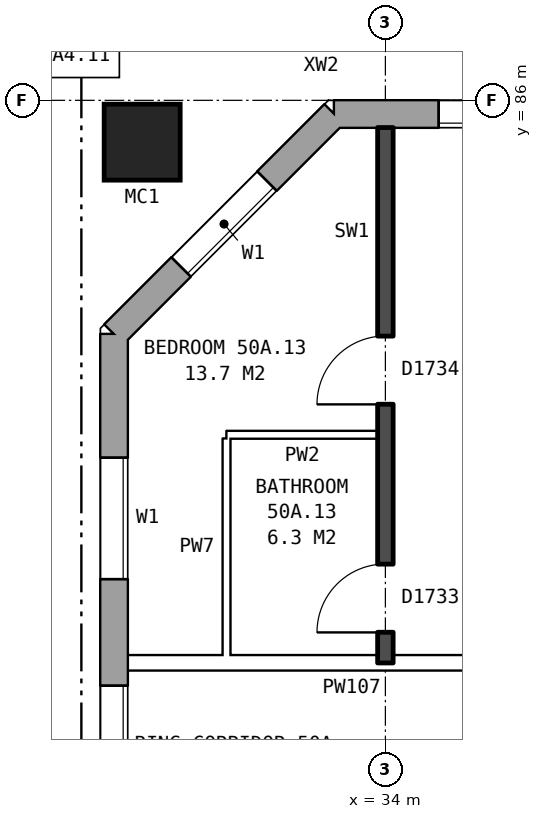
"""IFC4 building model, lengths in metres.
Left out: names, types, materials, properties, quantities, classifications, styles, units other than length and angle.
Written with IfcOpenShell. Run it as: python <this file> out.ifc"""

import sys

from ifc_helpers import new_model, si_unit, direction, frame, frame_2d, origin, origin_2d, place, context, subcontext, project, spatial, rectangle, hollow_rectangle, extrude, element, fill, save


model = new_model("IFC4")
c1 = context("Model", 3, precision=1e-05, world=origin(), true_north=direction((0.0, 1.0)))
c2 = subcontext(c1, "Body", "Model", "MODEL_VIEW")
j1 = project(units=[si_unit("LENGTHUNIT", "METRE"), si_unit("PLANEANGLEUNIT", "RADIAN")], contexts=[c1])
p1 = place(None, origin())
s1 = spatial("IfcSite", under=j1, at=p1, CompositionType="ELEMENT")
p2 = place(p1, origin())
s2 = spatial("IfcBuilding", under=s1, at=p2, CompositionType="ELEMENT")
p3 = place(p2, frame((0.0, 0.0, 178.9)))
s3 = spatial("IfcBuildingStorey", under=s2, at=p3, CompositionType="ELEMENT", Elevation=178.9)
p4 = place(p3, frame((30.8, 85.45, 0.0), z_axis=(0.0, 0.0, 1.0), x_axis=(1.0, 0.0, 0.0)))
e1 = element("IfcColumn", 1, at=p4, inside=s3, PredefinedType="COLUMN", context=c2, shape_type="SweptSolid", body=[
    extrude(hollow_rectangle(XDim=1.0, YDim=1.0, WallThickness=0.055, at=origin_2d()), origin(), (0.0, 0.0, 1.0), 3.1),
])
p5 = place(p3, frame((72.925, 85.82, 0.0), z_axis=(0.0, 0.0, 1.0), x_axis=(-1.0, 0.0, 0.0)))
e2 = element("IfcWall", 2, at=p5, inside=s3, PredefinedType="STANDARD", context=c2, shape_type="SweptSolid", body=[
    extrude(rectangle(XDim=39.601, YDim=0.36, at=frame_2d((19.8, 0.0))), origin(), (0.0, 0.0, 1.0), 2.85),
])
p6 = place(p5, frame((0.625, 0.0, 0.8)))
e3 = element("IfcOpeningElement", 3, at=p6, cuts=e2, PredefinedType="OPENING", context=c2, shape_type="SweptSolid", body=[
    extrude(rectangle(XDim=1.6, YDim=1.8, at=frame_2d((0.8, 0.9))), frame((0.0, 0.19, 0.0), z_axis=(0.0, -1.0, 0.0), x_axis=(1.0, 0.0, 0.0)), (0.0, 0.0, 1.0), 0.38),
])
p7 = place(p5, frame((3.125, 0.0, 0.8)))
e4 = element("IfcOpeningElement", 4, at=p7, cuts=e2, PredefinedType="OPENING", context=c2, shape_type="SweptSolid", body=[
    extrude(rectangle(XDim=1.6, YDim=1.8, at=frame_2d((0.8, 0.9))), frame((0.0, 0.19, 0.0), z_axis=(0.0, -1.0, 0.0), x_axis=(1.0, 0.0, 0.0)), (0.0, 0.0, 1.0), 0.38),
])
p8 = place(p5, frame((5.025, 0.0, 1.7)))
e5 = element("IfcOpeningElement", 5, at=p8, cuts=e2, PredefinedType="OPENING", context=c2, shape_type="SweptSolid", body=[
    extrude(rectangle(XDim=0.6, YDim=0.9, at=frame_2d((0.3, 0.45))), frame((0.0, 0.19, 0.0), z_axis=(0.0, -1.0, 0.0), x_axis=(1.0, 0.0, 0.0)), (0.0, 0.0, 1.0), 0.38),
])
p9 = place(p5, frame((9.625, 0.0, 0.8)))
e6 = element("IfcOpeningElement", 6, at=p9, cuts=e2, PredefinedType="OPENING", context=c2, shape_type="SweptSolid", body=[
    extrude(rectangle(XDim=1.6, YDim=1.8, at=frame_2d((0.8, 0.9))), frame((0.0, 0.19, 0.0), z_axis=(0.0, -1.0, 0.0), x_axis=(1.0, 0.0, 0.0)), (0.0, 0.0, 1.0), 0.38),
])
p10 = place(p5, frame((12.625, 0.0, 0.8)))
e7 = element("IfcOpeningElement", 7, at=p10, cuts=e2, PredefinedType="OPENING", context=c2, shape_type="SweptSolid", body=[
    extrude(rectangle(XDim=1.6, YDim=1.8, at=frame_2d((0.8, 0.9))), frame((0.0, 0.19, 0.0), z_axis=(0.0, -1.0, 0.0), x_axis=(1.0, 0.0, 0.0)), (0.0, 0.0, 1.0), 0.38),
])
p11 = place(p5, frame((15.625, 0.0, 0.8)))
e8 = element("IfcOpeningElement", 8, at=p11, cuts=e2, PredefinedType="OPENING", context=c2, shape_type="SweptSolid", body=[
    extrude(rectangle(XDim=1.6, YDim=1.8, at=frame_2d((0.8, 0.9))), frame((0.0, 0.19, 0.0), z_axis=(0.0, -1.0, 0.0), x_axis=(1.0, 0.0, 0.0)), (0.0, 0.0, 1.0), 0.38),
])
p12 = place(p5, frame((18.625, 0.0, 0.8)))
e9 = element("IfcOpeningElement", 9, at=p12, cuts=e2, PredefinedType="OPENING", context=c2, shape_type="SweptSolid", body=[
    extrude(rectangle(XDim=1.6, YDim=1.8, at=frame_2d((0.8, 0.9))), frame((0.0, 0.19, 0.0), z_axis=(0.0, -1.0, 0.0), x_axis=(1.0, 0.0, 0.0)), (0.0, 0.0, 1.0), 0.38),
])
p13 = place(p5, frame((21.625, 0.0, 0.8)))
e10 = element("IfcOpeningElement", 10, at=p13, cuts=e2, PredefinedType="OPENING", context=c2, shape_type="SweptSolid", body=[
    extrude(rectangle(XDim=1.6, YDim=1.8, at=frame_2d((0.8, 0.9))), frame((0.0, 0.19, 0.0), z_axis=(0.0, -1.0, 0.0), x_axis=(1.0, 0.0, 0.0)), (0.0, 0.0, 1.0), 0.38),
])
p14 = place(p5, frame((24.625, 0.0, 0.8)))
e11 = element("IfcOpeningElement", 11, at=p14, cuts=e2, PredefinedType="OPENING", context=c2, shape_type="SweptSolid", body=[
    extrude(rectangle(XDim=1.6, YDim=1.8, at=frame_2d((0.8, 0.9))), frame((0.0, 0.19, 0.0), z_axis=(0.0, -1.0, 0.0), x_axis=(1.0, 0.0, 0.0)), (0.0, 0.0, 1.0), 0.38),
])
p15 = place(p5, frame((27.625, 0.0, 0.8)))
e12 = element("IfcOpeningElement", 12, at=p15, cuts=e2, PredefinedType="OPENING", context=c2, shape_type="SweptSolid", body=[
    extrude(rectangle(XDim=1.6, YDim=1.8, at=frame_2d((0.8, 0.9))), frame((0.0, 0.19, 0.0), z_axis=(0.0, -1.0, 0.0), x_axis=(1.0, 0.0, 0.0)), (0.0, 0.0, 1.0), 0.38),
])
p16 = place(p5, frame((30.625, 0.0, 0.8)))
e13 = element("IfcOpeningElement", 13, at=p16, cuts=e2, PredefinedType="OPENING", context=c2, shape_type="SweptSolid", body=[
    extrude(rectangle(XDim=1.6, YDim=1.8, at=frame_2d((0.8, 0.9))), frame((0.0, 0.19, 0.0), z_axis=(0.0, -1.0, 0.0), x_axis=(1.0, 0.0, 0.0)), (0.0, 0.0, 1.0), 0.38),
])
p17 = place(p5, frame((33.925, 0.0, 1.7)))
e14 = element("IfcOpeningElement", 14, at=p17, cuts=e2, PredefinedType="OPENING", context=c2, shape_type="SweptSolid", body=[
    extrude(rectangle(XDim=0.6, YDim=0.9, at=frame_2d((0.3, 0.45))), frame((0.0, 0.19, 0.0), z_axis=(0.0, -1.0, 0.0), x_axis=(1.0, 0.0, 0.0)), (0.0, 0.0, 1.0), 0.38),
])
p18 = place(p5, frame((36.625, 0.0, 0.8)))
e15 = element("IfcOpeningElement", 15, at=p18, cuts=e2, PredefinedType="OPENING", context=c2, shape_type="SweptSolid", body=[
    extrude(rectangle(XDim=1.6, YDim=1.8, at=frame_2d((0.8, 0.9))), frame((0.0, 0.19, 0.0), z_axis=(0.0, -1.0, 0.0), x_axis=(1.0, 0.0, 0.0)), (0.0, 0.0, 1.0), 0.38),
])
p19 = place(p5, frame((6.825, 0.0, 0.8)))
e16 = element("IfcOpeningElement", 16, at=p19, cuts=e2, PredefinedType="OPENING", context=c2, shape_type="SweptSolid", body=[
    extrude(rectangle(XDim=0.6, YDim=0.9, at=frame_2d((0.3, 0.45))), frame((0.0, 0.19, 0.0), z_axis=(0.0, -1.0, 0.0), x_axis=(1.0, 0.0, 0.0)), (0.0, 0.0, 1.0), 0.38),
])
p20 = place(p5, frame((7.725, 0.0, 0.8)))
e17 = element("IfcOpeningElement", 17, at=p20, cuts=e2, PredefinedType="OPENING", context=c2, shape_type="SweptSolid", body=[
    extrude(rectangle(XDim=1.0, YDim=1.8, at=frame_2d((0.5, 0.9))), frame((0.0, 0.19, 0.0), z_axis=(0.0, -1.0, 0.0), x_axis=(1.0, 0.0, 0.0)), (0.0, 0.0, 1.0), 0.38),
])
p21 = place(p5, frame((34.825, 0.0, 0.8)))
e18 = element("IfcOpeningElement", 18, at=p21, cuts=e2, PredefinedType="OPENING", context=c2, shape_type="SweptSolid", body=[
    extrude(rectangle(XDim=1.4, YDim=1.8, at=frame_2d((0.7, 0.9))), frame((0.0, 0.19, 0.0), z_axis=(0.0, -1.0, 0.0), x_axis=(1.0, 0.0, 0.0)), (0.0, 0.0, 1.0), 0.38),
])
p22 = place(p3, frame((33.325, 85.82, 0.0), z_axis=(0.0, 0.0, 1.0), x_axis=(-0.707106781187, -0.707106781187, 0.0)))
e19 = element("IfcWall", 19, at=p22, inside=s3, PredefinedType="STANDARD", context=c2, shape_type="SweptSolid", body=[
    extrude(rectangle(XDim=4.094, YDim=0.36, at=frame_2d((2.047, 0.0))), origin(), (0.0, 0.0, 1.0), 2.85),
])
p23 = place(p22, frame((1.247, 0.0, 0.8)))
e20 = element("IfcOpeningElement", 20, at=p23, cuts=e19, PredefinedType="OPENING", context=c2, shape_type="SweptSolid", body=[
    extrude(rectangle(XDim=1.6, YDim=1.8, at=frame_2d((0.8, 0.9))), frame((0.0, 0.19, 0.0), z_axis=(0.0, -1.0, 0.0), x_axis=(1.0, 0.0, 0.0)), (0.0, 0.0, 1.0), 0.38),
])
p24 = place(p3, frame((30.43, 82.925, 0.0), z_axis=(0.0, 0.0, 1.0), x_axis=(0.0, -1.0, 0.0)))
e21 = element("IfcWall", 21, at=p24, inside=s3, PredefinedType="STANDARD", context=c2, shape_type="SweptSolid", body=[
    extrude(rectangle(XDim=25.851, YDim=0.36, at=frame_2d((12.925, 0.0))), origin(), (0.0, 0.0, 1.0), 2.85),
])
p25 = place(p24, frame((1.625, 0.0, 0.8)))
e22 = element("IfcOpeningElement", 22, at=p25, cuts=e21, PredefinedType="OPENING", context=c2, shape_type="SweptSolid", body=[
    extrude(rectangle(XDim=1.6, YDim=1.8, at=frame_2d((0.8, 0.9))), frame((0.0, 0.19, 0.0), z_axis=(0.0, -1.0, 0.0), x_axis=(1.0, 0.0, 0.0)), (0.0, 0.0, 1.0), 0.38),
])
p26 = place(p24, frame((4.625, 0.0, 0.8)))
e23 = element("IfcOpeningElement", 23, at=p26, cuts=e21, PredefinedType="OPENING", context=c2, shape_type="SweptSolid", body=[
    extrude(rectangle(XDim=1.6, YDim=1.8, at=frame_2d((0.8, 0.9))), frame((0.0, 0.19, 0.0), z_axis=(0.0, -1.0, 0.0), x_axis=(1.0, 0.0, 0.0)), (0.0, 0.0, 1.0), 0.38),
])
p27 = place(p24, frame((6.525, 0.0, 0.8)))
e24 = element("IfcOpeningElement", 24, at=p27, cuts=e21, PredefinedType="OPENING", context=c2, shape_type="SweptSolid", body=[
    extrude(rectangle(XDim=1.4, YDim=1.8, at=frame_2d((0.7, 0.9))), frame((0.0, 0.19, 0.0), z_axis=(0.0, -1.0, 0.0), x_axis=(1.0, 0.0, 0.0)), (0.0, 0.0, 1.0), 0.38),
])
p28 = place(p24, frame((8.225, 0.0, 1.6)))
e25 = element("IfcOpeningElement", 25, at=p28, cuts=e21, PredefinedType="OPENING", context=c2, shape_type="SweptSolid", body=[
    extrude(rectangle(XDim=0.8, YDim=0.9, at=frame_2d((0.4, 0.45))), frame((0.0, 0.19, 0.0), z_axis=(0.0, -1.0, 0.0), x_axis=(1.0, 0.0, 0.0)), (0.0, 0.0, 1.0), 0.38),
])
p29 = place(p24, frame((10.075, 0.0, 0.8)))
e26 = element("IfcOpeningElement", 26, at=p29, cuts=e21, PredefinedType="OPENING", context=c2, shape_type="SweptSolid", body=[
    extrude(rectangle(XDim=1.0, YDim=0.9, at=frame_2d((0.5, 0.45))), frame((0.0, 0.19, 0.0), z_axis=(0.0, -1.0, 0.0), x_axis=(1.0, 0.0, 0.0)), (0.0, 0.0, 1.0), 0.38),
])
p30 = place(p24, frame((11.375, 0.0, 0.8)))
e27 = element("IfcOpeningElement", 27, at=p30, cuts=e21, PredefinedType="OPENING", context=c2, shape_type="SweptSolid", body=[
    extrude(rectangle(XDim=1.2, YDim=1.8, at=frame_2d((0.6, 0.9))), frame((0.0, 0.19, 0.0), z_axis=(0.0, -1.0, 0.0), x_axis=(1.0, 0.0, 0.0)), (0.0, 0.0, 1.0), 0.38),
])
p31 = place(p24, frame((19.625, 0.0, 0.8)))
e28 = element("IfcOpeningElement", 28, at=p31, cuts=e21, PredefinedType="OPENING", context=c2, shape_type="SweptSolid", body=[
    extrude(rectangle(XDim=1.6, YDim=1.8, at=frame_2d((0.8, 0.9))), frame((0.0, 0.19, 0.0), z_axis=(0.0, -1.0, 0.0), x_axis=(1.0, 0.0, 0.0)), (0.0, 0.0, 1.0), 0.38),
])
p32 = place(p24, frame((22.625, 0.0, 0.8)))
e29 = element("IfcOpeningElement", 29, at=p32, cuts=e21, PredefinedType="OPENING", context=c2, shape_type="SweptSolid", body=[
    extrude(rectangle(XDim=1.6, YDim=1.8, at=frame_2d((0.8, 0.9))), frame((0.0, 0.19, 0.0), z_axis=(0.0, -1.0, 0.0), x_axis=(1.0, 0.0, 0.0)), (0.0, 0.0, 1.0), 0.38),
])
p33 = place(p24, frame((12.875, 0.0, 0.8)))
e30 = element("IfcOpeningElement", 30, at=p33, cuts=e21, PredefinedType="OPENING", context=c2, shape_type="SweptSolid", body=[
    extrude(rectangle(XDim=1.6, YDim=1.8, at=frame_2d((0.8, 0.9))), frame((0.0, 0.19, 0.0), z_axis=(0.0, -1.0, 0.0), x_axis=(1.0, 0.0, 0.0)), (0.0, 0.0, 1.0), 0.38),
])
p34 = place(p24, frame((14.775, 0.0, 0.8)))
e31 = element("IfcOpeningElement", 31, at=p34, cuts=e21, PredefinedType="OPENING", context=c2, shape_type="SweptSolid", body=[
    extrude(rectangle(XDim=1.0, YDim=0.9, at=frame_2d((0.5, 0.45))), frame((0.0, 0.19, 0.0), z_axis=(0.0, -1.0, 0.0), x_axis=(1.0, 0.0, 0.0)), (0.0, 0.0, 1.0), 0.38),
])
p35 = place(p24, frame((16.675, 0.0, 1.7)))
e32 = element("IfcOpeningElement", 32, at=p35, cuts=e21, PredefinedType="OPENING", context=c2, shape_type="SweptSolid", body=[
    extrude(rectangle(XDim=0.8, YDim=0.9, at=frame_2d((0.4, 0.45))), frame((0.0, 0.19, 0.0), z_axis=(0.0, -1.0, 0.0), x_axis=(1.0, 0.0, 0.0)), (0.0, 0.0, 1.0), 0.38),
])
p36 = place(p24, frame((17.925, 0.0, 0.8)))
e33 = element("IfcOpeningElement", 33, at=p36, cuts=e21, PredefinedType="OPENING", context=c2, shape_type="SweptSolid", body=[
    extrude(rectangle(XDim=1.4, YDim=1.8, at=frame_2d((0.7, 0.9))), frame((0.0, 0.19, 0.0), z_axis=(0.0, -1.0, 0.0), x_axis=(1.0, 0.0, 0.0)), (0.0, 0.0, 1.0), 0.38),
])
p37 = place(p3, frame((30.61, 78.6, 0.0), z_axis=(0.0, 0.0, 1.0), x_axis=(1.0, 0.0, 0.0)))
e34 = element("IfcWall", 34, at=p37, inside=s3, PredefinedType="PARTITIONING", context=c2, shape_type="SweptSolid", body=[
    extrude(rectangle(XDim=15.29, YDim=0.2, at=frame_2d((7.645, 0.0))), origin(), (0.0, 0.0, 1.0), 2.85),
])
p38 = place(p37, frame((10.69, 0.0, 0.0)))
e35 = element("IfcOpeningElement", 35, at=p38, cuts=e34, PredefinedType="OPENING", context=c2, shape_type="SweptSolid", body=[
    extrude(rectangle(XDim=1.0, YDim=2.1, at=frame_2d((0.5, 1.05))), frame((0.0, 0.11, 0.0), z_axis=(0.0, -1.0, 0.0), x_axis=(1.0, 0.0, 0.0)), (0.0, 0.0, 1.0), 0.22),
])
p39 = place(p37, frame((5.89, 0.0, 0.0)))
e36 = element("IfcOpeningElement", 36, at=p39, cuts=e34, PredefinedType="OPENING", context=c2, shape_type="SweptSolid", body=[
    extrude(rectangle(XDim=1.0, YDim=2.1, at=frame_2d((0.5, 1.05))), frame((0.0, 0.11, 0.0), z_axis=(0.0, -1.0, 0.0), x_axis=(1.0, 0.0, 0.0)), (0.0, 0.0, 1.0), 0.22),
])
p40 = place(p3, frame((31.91, 81.6, 0.0), z_axis=(0.0, 0.0, 1.0), x_axis=(1.0, 0.0, 0.0)))
e37 = element("IfcWall", 37, at=p40, inside=s3, PredefinedType="PARTITIONING", context=c2, shape_type="SweptSolid", body=[
    extrude(rectangle(XDim=1.99, YDim=0.1, at=frame_2d((0.995, 0.0))), origin(), (0.0, 0.0, 1.0), 2.85),
])
p41 = place(p3, frame((31.91, 78.7, 0.0), z_axis=(0.0, 0.0, 1.0), x_axis=(0.0, 1.0, 0.0)))
e38 = element("IfcWall", 38, at=p41, inside=s3, PredefinedType="PARTITIONING", context=c2, shape_type="SweptSolid", body=[
    extrude(rectangle(XDim=2.85, YDim=0.1, at=frame_2d((1.425, 0.0))), origin(), (0.0, 0.0, 1.0), 2.85),
])
p42 = place(p3, frame((34.0, 78.6, 0.0), z_axis=(0.0, 0.0, 1.0), x_axis=(0.0, 1.0, 0.0)))
e39 = element("IfcWall", 39, at=p42, inside=s3, PredefinedType="SOLIDWALL", context=c2, shape_type="SweptSolid", body=[
    extrude(rectangle(XDim=7.04, YDim=0.2, at=frame_2d((3.52, 0.0))), origin(), (0.0, 0.0, 1.0), 2.85),
])
p43 = place(p42, frame((3.4, 0.0, 0.0)))
e40 = element("IfcOpeningElement", 40, at=p43, cuts=e39, PredefinedType="OPENING", context=c2, shape_type="SweptSolid", body=[
    extrude(rectangle(XDim=0.9, YDim=2.1, at=frame_2d((0.45, 1.05))), frame((0.0, 0.11, 0.0), z_axis=(0.0, -1.0, 0.0), x_axis=(1.0, 0.0, 0.0)), (0.0, 0.0, 1.0), 0.22),
])
p44 = place(p42, frame((0.4, 0.0, 0.0)))
e41 = element("IfcOpeningElement", 41, at=p44, cuts=e39, PredefinedType="OPENING", context=c2, shape_type="SweptSolid", body=[
    extrude(rectangle(XDim=0.9, YDim=2.1, at=frame_2d((0.45, 1.05))), frame((0.0, 0.11, 0.0), z_axis=(0.0, -1.0, 0.0), x_axis=(1.0, 0.0, 0.0)), (0.0, 0.0, 1.0), 0.22),
])
p45 = place(p18, origin())
e42 = element("IfcWindow", 42, at=p45, inside=s3, PartitioningType="SINGLE_PANEL", PredefinedType="WINDOW", context=c2, shape_type="SweptSolid", body=[
    extrude(rectangle(XDim=1.6, YDim=1.8, at=frame_2d((0.8, 0.9))), frame((0.0, 0.15, 0.0), z_axis=(0.0, -1.0, 0.0), x_axis=(1.0, 0.0, 0.0)), (0.0, 0.0, 1.0), 0.06),
])
fill(e15, e42)
p46 = place(p23, origin())
e43 = element("IfcWindow", 43, at=p46, inside=s3, PartitioningType="SINGLE_PANEL", PredefinedType="WINDOW", context=c2, shape_type="SweptSolid", body=[
    extrude(rectangle(XDim=1.6, YDim=1.8, at=frame_2d((0.8, 0.9))), frame((0.0, 0.15, 0.0), z_axis=(0.0, -1.0, 0.0), x_axis=(1.0, 0.0, 0.0)), (0.0, 0.0, 1.0), 0.06),
])
fill(e20, e43)
p47 = place(p25, origin())
e44 = element("IfcWindow", 44, at=p47, inside=s3, PartitioningType="SINGLE_PANEL", PredefinedType="WINDOW", context=c2, shape_type="SweptSolid", body=[
    extrude(rectangle(XDim=1.6, YDim=1.8, at=frame_2d((0.8, 0.9))), frame((0.0, 0.15, 0.0), z_axis=(0.0, -1.0, 0.0), x_axis=(1.0, 0.0, 0.0)), (0.0, 0.0, 1.0), 0.06),
])
fill(e22, e44)
p48 = place(p26, origin())
e45 = element("IfcWindow", 45, at=p48, inside=s3, PartitioningType="SINGLE_PANEL", PredefinedType="WINDOW", context=c2, shape_type="SweptSolid", body=[
    extrude(rectangle(XDim=1.6, YDim=1.8, at=frame_2d((0.8, 0.9))), frame((0.0, 0.15, 0.0), z_axis=(0.0, -1.0, 0.0), x_axis=(1.0, 0.0, 0.0)), (0.0, 0.0, 1.0), 0.06),
])
fill(e23, e45)
p49 = place(p43, origin())
e46 = element("IfcDoor", 46, at=p49, inside=s3, OperationType="SINGLE_SWING_LEFT", PredefinedType="DOOR", context=c2, shape_type="SweptSolid", body=[
    extrude(rectangle(XDim=0.9, YDim=2.1, at=frame_2d((0.45, 1.05))), frame((0.0, 0.025, 0.0), z_axis=(0.0, -1.0, 0.0), x_axis=(1.0, 0.0, 0.0)), (0.0, 0.0, 1.0), 0.05),
])
fill(e40, e46)
p50 = place(p44, origin())
e47 = element("IfcDoor", 47, at=p50, inside=s3, OperationType="SINGLE_SWING_LEFT", PredefinedType="DOOR", context=c2, shape_type="SweptSolid", body=[
    extrude(rectangle(XDim=0.9, YDim=2.1, at=frame_2d((0.45, 1.05))), frame((0.0, 0.025, 0.0), z_axis=(0.0, -1.0, 0.0), x_axis=(1.0, 0.0, 0.0)), (0.0, 0.0, 1.0), 0.05),
])
fill(e41, e47)
save(model, sys.argv[1])
